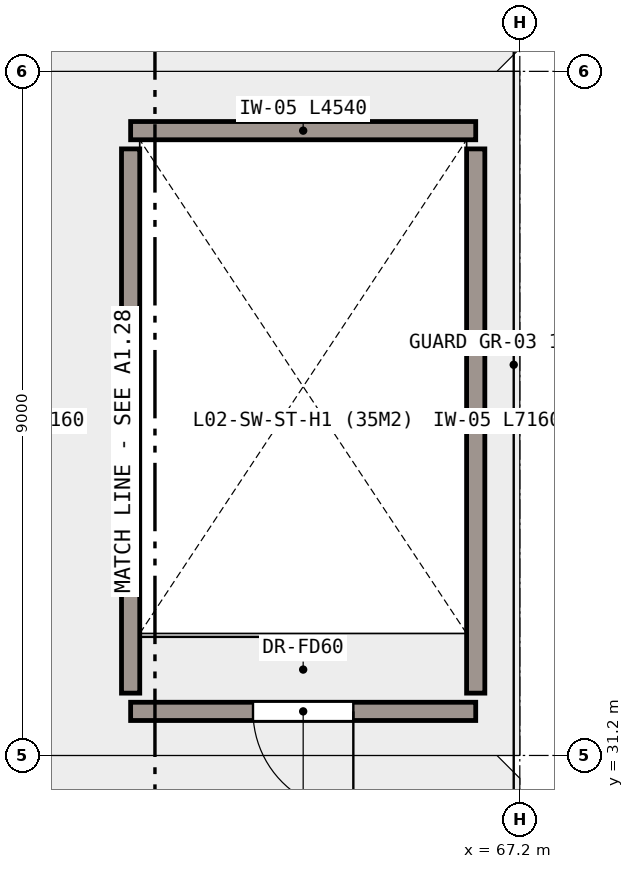
"""IFC4 building model, lengths in metres.
Left out: names, types, materials, properties, quantities, classifications, styles, units other than length and angle.
Written with IfcOpenShell. Run it as: python <this file> out.ifc"""

import sys

from ifc_helpers import new_model, si_unit, direction, frame, frame_2d, origin, place, context, subcontext, project, spatial, rectangle, extrude, element, fill, save


model = new_model("IFC4")
c1 = context("Model", 3, precision=1e-05, world=origin(), true_north=direction((0.0, 1.0)))
c2 = subcontext(c1, "Body", "Model", "MODEL_VIEW")
j1 = project(units=[si_unit("LENGTHUNIT", "METRE"), si_unit("PLANEANGLEUNIT", "RADIAN")], contexts=[c1])
p1 = place(None, origin())
s1 = spatial("IfcSite", under=j1, at=p1, CompositionType="ELEMENT")
p2 = place(p1, origin())
s2 = spatial("IfcBuilding", under=s1, at=p2, CompositionType="ELEMENT")
p3 = place(p2, frame((0.0, 0.0, 10.2)))
s3 = spatial("IfcBuildingStorey", under=s2, at=p3, CompositionType="ELEMENT", Elevation=10.2)
p4 = place(p3, frame((66.62, 31.78, 0.0), z_axis=(0.0, 0.0, 1.0), x_axis=(-1.0, 0.0, 0.0)))
e1 = element("IfcWall", 1, at=p4, inside=s3, PredefinedType="SHEAR", context=c2, shape_type="SweptSolid", body=[
    extrude(rectangle(XDim=4.54, YDim=0.24, at=frame_2d((2.27, 0.0))), origin(), (0.0, 0.0, 1.0), 3.95),
])
p5 = place(p4, frame((1.61, 0.0, 0.0)))
e2 = element("IfcOpeningElement", 2, at=p5, cuts=e1, PredefinedType="OPENING", context=c2, shape_type="SweptSolid", body=[
    extrude(rectangle(XDim=1.32, YDim=2.15, at=frame_2d((0.66, 1.075))), frame((0.0, 0.13, 0.0), z_axis=(0.0, -1.0, 0.0), x_axis=(1.0, 0.0, 0.0)), (0.0, 0.0, 1.0), 0.26),
])
p6 = place(p3, frame((62.08, 39.42, 0.0), z_axis=(0.0, 0.0, 1.0), x_axis=(1.0, 0.0, 0.0)))
e3 = element("IfcWall", 3, at=p6, inside=s3, PredefinedType="SHEAR", context=c2, shape_type="SweptSolid", body=[
    extrude(rectangle(XDim=4.54, YDim=0.24, at=frame_2d((2.27, 0.0))), origin(), (0.0, 0.0, 1.0), 3.95),
])
for number, where, z_axis, x_axis in (
    (4, (62.08, 32.02, 0.0), (0.0, 0.0, 1.0), (0.0, 1.0, 0.0)),
    (5, (66.62, 39.18, 0.0), (0.0, 0.0, 1.0), (0.0, -1.0, 0.0)),
):
    element("IfcWall", number, at=place(p3, frame(where, z_axis=z_axis, x_axis=x_axis)), inside=s3, PredefinedType="SHEAR", context=c2, shape_type="SweptSolid", body=[
        extrude(rectangle(XDim=7.16, YDim=0.24, at=frame_2d((3.58, 0.0))), origin(), (0.0, 0.0, 1.0), 3.95),
    ])
p7 = place(p5, origin())
e6 = element("IfcDoor", 6, at=p7, inside=s3, OperationType="SINGLE_SWING_LEFT", PredefinedType="DOOR", context=c2, shape_type="SweptSolid", body=[
    extrude(rectangle(XDim=1.32, YDim=2.15, at=frame_2d((0.66, 1.075))), frame((0.0, 0.025, 0.0), z_axis=(0.0, -1.0, 0.0), x_axis=(1.0, 0.0, 0.0)), (0.0, 0.0, 1.0), 0.05),
])
fill(e2, e6)
save(model, sys.argv[1])
